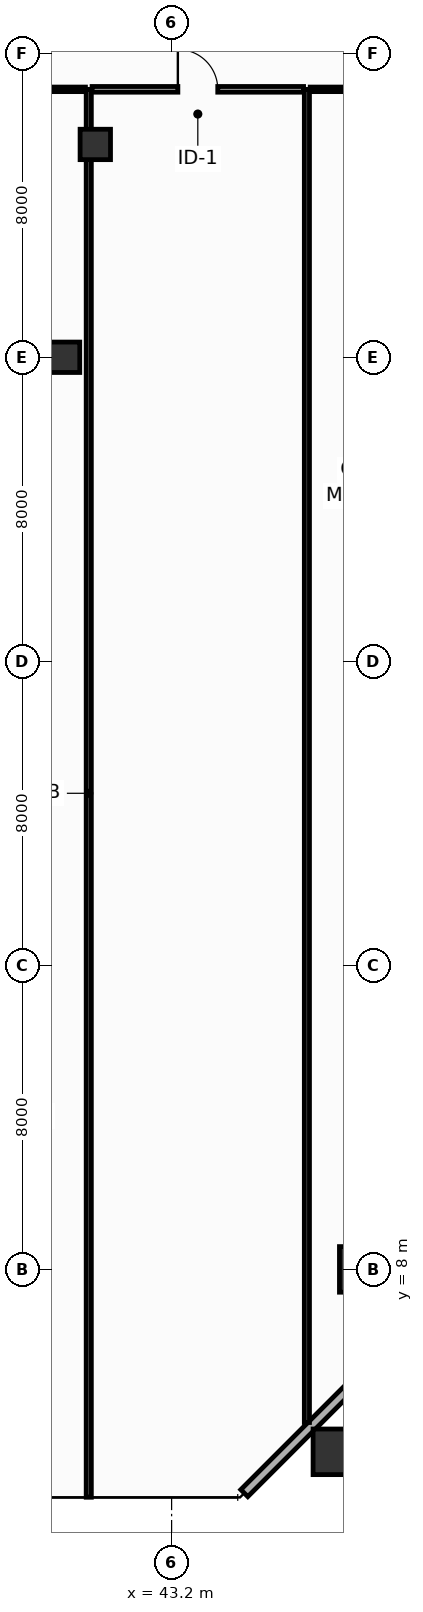
"""IFC4 building model, lengths in metres.
Left out: names, types, materials, properties, quantities, classifications, styles, units other than length and angle.
Written with IfcOpenShell. Run it as: python <this file> out.ifc"""

import sys

from ifc_helpers import new_model, si_unit, direction, frame, frame_2d, origin, origin_2d, place, context, subcontext, project, spatial, rectangle, hollow_rectangle, extrude, element, fill, save


model = new_model("IFC4")
c1 = context("Model", 3, precision=1e-05, world=origin(), true_north=direction((0.0, 1.0)))
c2 = subcontext(c1, "Body", "Model", "MODEL_VIEW")
j1 = project(units=[si_unit("LENGTHUNIT", "METRE"), si_unit("PLANEANGLEUNIT", "RADIAN")], contexts=[c1])
p1 = place(None, origin())
s1 = spatial("IfcSite", under=j1, at=p1, CompositionType="ELEMENT")
p2 = place(p1, origin())
s2 = spatial("IfcBuilding", under=s1, at=p2, CompositionType="ELEMENT")
p3 = place(p2, frame((0.0, 0.0, 73.6)))
s3 = spatial("IfcBuildingStorey", under=s2, at=p3, CompositionType="ELEMENT", Elevation=73.6)
for number, where, z_axis, x_axis in (
    (1, (47.523, 3.2, 0.0), (0.0, 0.0, 1.0), (1.0, 0.0, 0.0)),
    (2, (48.217, 8.0, 0.0), (0.0, 0.0, 1.0), (1.0, 0.0, 0.0)),
):
    element("IfcColumn", number, at=place(p3, frame(where, z_axis=z_axis, x_axis=x_axis)), inside=s3, PredefinedType="COLUMN", context=c2, shape_type="SweptSolid", body=[
        extrude(hollow_rectangle(XDim=1.2, YDim=1.2, WallThickness=0.055, at=origin_2d()), origin(), (0.0, 0.0, 1.0), 4.4),
    ])
for number, where, z_axis, x_axis in (
    (3, (40.383, 32.0, 0.0), (0.0, 0.0, 1.0), (1.0, 0.0, 0.0)),
    (4, (41.192, 37.6, 0.0), (0.0, 0.0, 1.0), (1.0, 0.0, 0.0)),
):
    element("IfcColumn", number, at=place(p3, frame(where, z_axis=z_axis, x_axis=x_axis)), inside=s3, PredefinedType="COLUMN", context=c2, shape_type="SweptSolid", body=[
        extrude(hollow_rectangle(XDim=0.8, YDim=0.8, WallThickness=0.036, at=origin_2d()), origin(), (0.0, 0.0, 1.0), 4.4),
    ])
p4 = place(p3, frame((45.113, 2.113, 0.0), z_axis=(0.0, 0.0, 1.0), x_axis=(0.707106781187, 0.707106781187, 0.0)))
e5 = element("IfcWall", 5, at=p4, inside=s3, PredefinedType="STANDARD", context=c2, shape_type="SweptSolid", body=[
    extrude(rectangle(XDim=4.206, YDim=0.26, at=frame_2d((2.103, 0.0))), origin(), (0.0, 0.0, 1.0), 4.15),
])
p5 = place(p3, frame((41.02, 2.005, 0.0), z_axis=(0.0, 0.0, 1.0), x_axis=(0.0, 1.0, 0.0)))
e6 = element("IfcWall", 6, at=p5, inside=s3, PredefinedType="PARTITIONING", context=c2, shape_type="SweptSolid", body=[
    extrude(rectangle(XDim=37.045, YDim=0.135, at=frame_2d((18.522, 0.0))), origin(), (0.0, 0.0, 1.0), 3.335),
])
p6 = place(p3, frame((46.76, 3.972, 0.0), z_axis=(0.0, 0.0, 1.0), x_axis=(0.0, 1.0, 0.0)))
e7 = element("IfcWall", 7, at=p6, inside=s3, PredefinedType="PARTITIONING", context=c2, shape_type="SweptSolid", body=[
    extrude(rectangle(XDim=35.078, YDim=0.135, at=frame_2d((17.539, 0.0))), origin(), (0.0, 0.0, 1.0), 3.335),
])
p7 = place(p3, frame((36.15, 39.05, 0.0), z_axis=(0.0, 0.0, 1.0), x_axis=(1.0, 0.0, 0.0)))
e8 = element("IfcWall", 8, at=p7, inside=s3, PredefinedType="PARTITIONING", context=c2, shape_type="SweptSolid", body=[
    extrude(rectangle(XDim=4.783, YDim=0.12, at=frame_2d((2.391, 0.0))), origin(), (0.0, 0.0, 1.0), 3.335),
])
p8 = place(p7, frame((1.941, 0.0, 0.0)))
e9 = element("IfcOpeningElement", 9, at=p8, cuts=e8, PredefinedType="OPENING", context=c2, shape_type="SweptSolid", body=[
    extrude(rectangle(XDim=0.9, YDim=2.1, at=frame_2d((0.45, 1.05))), frame((0.0, 0.07, 0.0), z_axis=(0.0, -1.0, 0.0), x_axis=(1.0, 0.0, 0.0)), (0.0, 0.0, 1.0), 0.14),
])
p9 = place(p3, frame((41.107, 39.05, 0.0), z_axis=(0.0, 0.0, 1.0), x_axis=(1.0, 0.0, 0.0)))
e10 = element("IfcWall", 10, at=p9, inside=s3, PredefinedType="PARTITIONING", context=c2, shape_type="SweptSolid", body=[
    extrude(rectangle(XDim=5.565, YDim=0.15, at=frame_2d((2.783, 0.0))), origin(), (0.0, 0.0, 1.0), 4.15),
])
p10 = place(p9, frame((2.257, 0.0, 0.0)))
e11 = element("IfcOpeningElement", 11, at=p10, cuts=e10, PredefinedType="OPENING", context=c2, shape_type="SweptSolid", body=[
    extrude(rectangle(XDim=1.05, YDim=2.15, at=frame_2d((0.525, 1.075))), frame((0.0, 0.085, 0.0), z_axis=(0.0, -1.0, 0.0), x_axis=(1.0, 0.0, 0.0)), (0.0, 0.0, 1.0), 0.17),
])
p11 = place(p3, frame((46.847, 39.05, 0.0), z_axis=(0.0, 0.0, 1.0), x_axis=(1.0, 0.0, 0.0)))
e12 = element("IfcWall", 12, at=p11, inside=s3, PredefinedType="PARTITIONING", context=c2, shape_type="SweptSolid", body=[
    extrude(rectangle(XDim=6.804, YDim=0.12, at=frame_2d((3.402, 0.0))), origin(), (0.0, 0.0, 1.0), 3.635),
])
p12 = place(p11, frame((2.952, 0.0, 0.0)))
e13 = element("IfcOpeningElement", 13, at=p12, cuts=e12, PredefinedType="OPENING", context=c2, shape_type="SweptSolid", body=[
    extrude(rectangle(XDim=0.9, YDim=2.1, at=frame_2d((0.45, 1.05))), frame((0.0, 0.07, 0.0), z_axis=(0.0, -1.0, 0.0), x_axis=(1.0, 0.0, 0.0)), (0.0, 0.0, 1.0), 0.14),
])
p13 = place(p10, origin())
e14 = element("IfcDoor", 14, at=p13, inside=s3, OperationType="SINGLE_SWING_LEFT", PredefinedType="DOOR", context=c2, shape_type="SweptSolid", body=[
    extrude(rectangle(XDim=1.05, YDim=2.15, at=frame_2d((0.525, 1.075))), frame((0.0, 0.025, 0.0), z_axis=(0.0, -1.0, 0.0), x_axis=(1.0, 0.0, 0.0)), (0.0, 0.0, 1.0), 0.05),
])
fill(e11, e14)
save(model, sys.argv[1])
